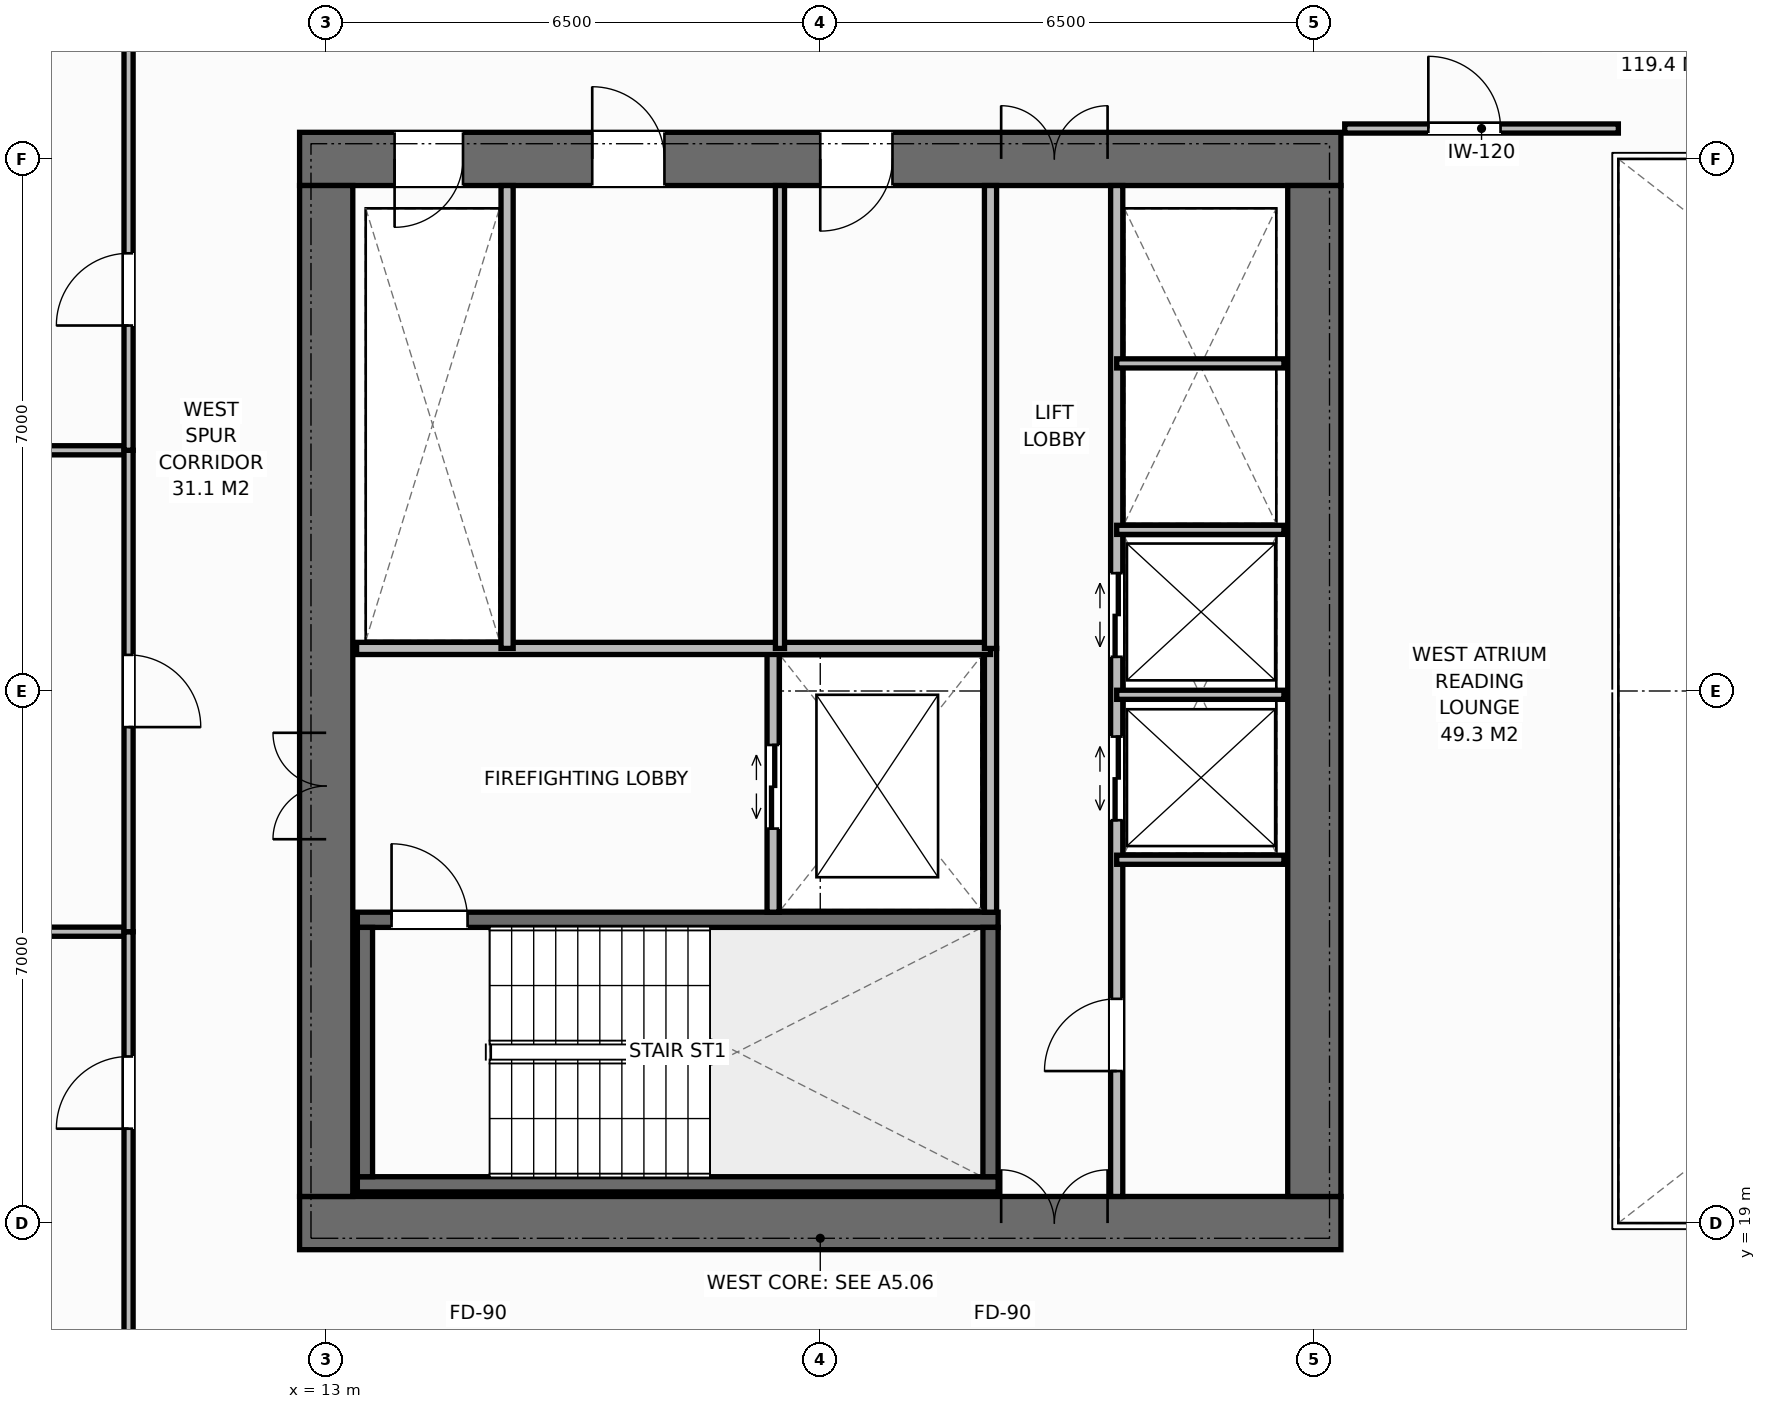
"""IFC4 building model, lengths in metres.
Left out: names, types, materials, properties, quantities, classifications, styles, units other than length and angle.
Written with IfcOpenShell. Run it as: python <this file> out.ifc"""

import sys

from ifc_helpers import new_model, si_unit, direction, frame, frame_2d, origin, place, context, subcontext, project, spatial, rectangle, extrude, element, fill, save


model = new_model("IFC4")
c1 = context("Model", 3, precision=1e-05, world=origin(), true_north=direction((0.0, 1.0)))
c2 = subcontext(c1, "Body", "Model", "MODEL_VIEW")
j1 = project(units=[si_unit("LENGTHUNIT", "METRE"), si_unit("PLANEANGLEUNIT", "RADIAN")], contexts=[c1])
p1 = place(None, origin())
s1 = spatial("IfcSite", under=j1, at=p1, CompositionType="ELEMENT")
p2 = place(p1, origin())
s2 = spatial("IfcBuilding", under=s1, at=p2, CompositionType="ELEMENT")
p3 = place(p2, frame((0.0, 0.0, 116.4)))
s3 = spatial("IfcBuildingStorey", under=s2, at=p3, CompositionType="ELEMENT", Elevation=116.4)
p4 = place(p3, frame((12.65, 19.0, 0.0), z_axis=(0.0, 0.0, 1.0), x_axis=(1.0, 0.0, 0.0)))
e1 = element("IfcWall", 1, at=p4, inside=s3, PredefinedType="SHEAR", context=c2, shape_type="SweptSolid", body=[
    extrude(rectangle(XDim=13.7, YDim=0.7, at=frame_2d((6.85, 0.0))), origin(), (0.0, 0.0, 1.0), 3.8),
])
p5 = place(p4, frame((9.23, 0.0, 0.0)))
e2 = element("IfcOpeningElement", 2, at=p5, cuts=e1, PredefinedType="OPENING", context=c2, shape_type="SweptSolid", body=[
    extrude(rectangle(XDim=1.4, YDim=2.2, at=frame_2d((0.7, 1.1))), frame((0.0, 0.36, 0.0), z_axis=(0.0, -1.0, 0.0), x_axis=(1.0, 0.0, 0.0)), (0.0, 0.0, 1.0), 0.72),
])
p6 = place(p3, frame((12.65, 33.0, 0.0), z_axis=(0.0, 0.0, 1.0), x_axis=(1.0, 0.0, 0.0)))
e3 = element("IfcWall", 3, at=p6, inside=s3, PredefinedType="SHEAR", context=c2, shape_type="SweptSolid", body=[
    extrude(rectangle(XDim=13.7, YDim=0.7, at=frame_2d((6.85, 0.0))), origin(), (0.0, 0.0, 1.0), 3.8),
])
p7 = place(p6, frame((1.25, 0.0, 0.0)))
e4 = element("IfcOpeningElement", 4, at=p7, cuts=e3, PredefinedType="OPENING", context=c2, shape_type="SweptSolid", body=[
    extrude(rectangle(XDim=0.9, YDim=2.15, at=frame_2d((0.45, 1.075))), frame((0.0, 0.36, 0.0), z_axis=(0.0, -1.0, 0.0), x_axis=(1.0, 0.0, 0.0)), (0.0, 0.0, 1.0), 0.72),
])
p8 = place(p6, frame((3.85, 0.0, 0.0)))
e5 = element("IfcOpeningElement", 5, at=p8, cuts=e3, PredefinedType="OPENING", context=c2, shape_type="SweptSolid", body=[
    extrude(rectangle(XDim=0.95, YDim=2.15, at=frame_2d((0.475, 1.075))), frame((0.0, 0.36, 0.0), z_axis=(0.0, -1.0, 0.0), x_axis=(1.0, 0.0, 0.0)), (0.0, 0.0, 1.0), 0.72),
])
p9 = place(p6, frame((6.85, 0.0, 0.0)))
e6 = element("IfcOpeningElement", 6, at=p9, cuts=e3, PredefinedType="OPENING", context=c2, shape_type="SweptSolid", body=[
    extrude(rectangle(XDim=0.95, YDim=2.15, at=frame_2d((0.475, 1.075))), frame((0.0, 0.36, 0.0), z_axis=(0.0, -1.0, 0.0), x_axis=(1.0, 0.0, 0.0)), (0.0, 0.0, 1.0), 0.72),
])
p10 = place(p6, frame((9.23, 0.0, 0.0)))
e7 = element("IfcOpeningElement", 7, at=p10, cuts=e3, PredefinedType="OPENING", context=c2, shape_type="SweptSolid", body=[
    extrude(rectangle(XDim=1.4, YDim=2.2, at=frame_2d((0.7, 1.1))), frame((0.0, 0.36, 0.0), z_axis=(0.0, -1.0, 0.0), x_axis=(1.0, 0.0, 0.0)), (0.0, 0.0, 1.0), 0.72),
])
p11 = place(p3, frame((13.0, 19.35, 0.0), z_axis=(0.0, 0.0, 1.0), x_axis=(0.0, 1.0, 0.0)))
e8 = element("IfcWall", 8, at=p11, inside=s3, PredefinedType="SHEAR", context=c2, shape_type="SweptSolid", body=[
    extrude(rectangle(XDim=13.3, YDim=0.7, at=frame_2d((6.65, 0.0))), origin(), (0.0, 0.0, 1.0), 3.8),
])
p12 = place(p11, frame((4.7, 0.0, 0.0)))
e9 = element("IfcOpeningElement", 9, at=p12, cuts=e8, PredefinedType="OPENING", context=c2, shape_type="SweptSolid", body=[
    extrude(rectangle(XDim=1.4, YDim=2.2, at=frame_2d((0.7, 1.1))), frame((0.0, 0.36, 0.0), z_axis=(0.0, -1.0, 0.0), x_axis=(1.0, 0.0, 0.0)), (0.0, 0.0, 1.0), 0.72),
])
p13 = place(p3, frame((26.0, 19.35, 0.0), z_axis=(0.0, 0.0, 1.0), x_axis=(0.0, 1.0, 0.0)))
e10 = element("IfcWall", 10, at=p13, inside=s3, PredefinedType="SHEAR", context=c2, shape_type="SweptSolid", body=[
    extrude(rectangle(XDim=13.3, YDim=0.7, at=frame_2d((6.65, 0.0))), origin(), (0.0, 0.0, 1.0), 3.8),
])
p14 = place(p3, frame((13.41, 19.51, 0.0), z_axis=(0.0, 0.0, 1.0), x_axis=(1.0, 0.0, 0.0)))
e11 = element("IfcWall", 11, at=p14, inside=s3, PredefinedType="SHEAR", context=c2, shape_type="SweptSolid", body=[
    extrude(rectangle(XDim=8.43, YDim=0.2, at=frame_2d((4.215, 0.0))), origin(), (0.0, 0.0, 1.0), 3.8),
])
p15 = place(p3, frame((13.41, 22.99, 0.0), z_axis=(0.0, 0.0, 1.0), x_axis=(1.0, 0.0, 0.0)))
e12 = element("IfcWall", 12, at=p15, inside=s3, PredefinedType="SHEAR", context=c2, shape_type="SweptSolid", body=[
    extrude(rectangle(XDim=8.43, YDim=0.2, at=frame_2d((4.215, 0.0))), origin(), (0.0, 0.0, 1.0), 3.8),
])
p16 = place(p15, frame((0.45, 0.0, 0.0)))
e13 = element("IfcOpeningElement", 13, at=p16, cuts=e12, PredefinedType="OPENING", context=c2, shape_type="SweptSolid", body=[
    extrude(rectangle(XDim=1.0, YDim=2.15, at=frame_2d((0.5, 1.075))), frame((0.0, 0.11, 0.0), z_axis=(0.0, -1.0, 0.0), x_axis=(1.0, 0.0, 0.0)), (0.0, 0.0, 1.0), 0.22),
])
for number, where, z_axis, x_axis in (
    (14, (13.51, 19.61, 0.0), (0.0, 0.0, 1.0), (0.0, 1.0, 0.0)),
    (15, (21.74, 19.61, 0.0), (0.0, 0.0, 1.0), (0.0, 1.0, 0.0)),
):
    element("IfcWall", number, at=place(p3, frame(where, z_axis=z_axis, x_axis=x_axis)), inside=s3, PredefinedType="SHEAR", context=c2, shape_type="SweptSolid", body=[
        extrude(rectangle(XDim=3.28, YDim=0.2, at=frame_2d((1.64, 0.0))), origin(), (0.0, 0.0, 1.0), 3.8),
    ])
p17 = place(p3, frame((21.74, 23.09, 0.0), z_axis=(0.0, 0.0, 1.0), x_axis=(0.0, 1.0, 0.0)))
e16 = element("IfcWall", 16, at=p17, inside=s3, PredefinedType="STANDARD", context=c2, shape_type="SweptSolid", body=[
    extrude(rectangle(XDim=3.47, YDim=0.16, at=frame_2d((1.735, 0.0))), origin(), (0.0, 0.0, 1.0), 3.565),
])
p18 = place(p3, frame((18.88, 23.09, 0.0), z_axis=(0.0, 0.0, 1.0), x_axis=(0.0, 1.0, 0.0)))
e17 = element("IfcWall", 17, at=p18, inside=s3, PredefinedType="STANDARD", context=c2, shape_type="SweptSolid", body=[
    extrude(rectangle(XDim=3.47, YDim=0.16, at=frame_2d((1.735, 0.0))), origin(), (0.0, 0.0, 1.0), 3.565),
])
p19 = place(p18, frame((1.1, 0.0, 0.0)))
e18 = element("IfcOpeningElement", 18, at=p19, cuts=e17, PredefinedType="OPENING", context=c2, shape_type="SweptSolid", body=[
    extrude(rectangle(XDim=1.1, YDim=2.2, at=frame_2d((0.55, 1.1))), frame((0.0, 0.09, 0.0), z_axis=(0.0, -1.0, 0.0), x_axis=(1.0, 0.0, 0.0)), (0.0, 0.0, 1.0), 0.18),
])
p20 = place(p3, frame((13.4, 26.56, 0.0), z_axis=(0.0, 0.0, 1.0), x_axis=(1.0, 0.0, 0.0)))
e19 = element("IfcWall", 19, at=p20, inside=s3, PredefinedType="STANDARD", context=c2, shape_type="SweptSolid", body=[
    extrude(rectangle(XDim=8.34, YDim=0.16, at=frame_2d((4.17, 0.0))), origin(), (0.0, 0.0, 1.0), 3.565),
])
p21 = place(p3, frame((15.38, 26.56, 0.0), z_axis=(0.0, 0.0, 1.0), x_axis=(0.0, 1.0, 0.0)))
e20 = element("IfcWall", 20, at=p21, inside=s3, PredefinedType="STANDARD", context=c2, shape_type="SweptSolid", body=[
    extrude(rectangle(XDim=6.09, YDim=0.16, at=frame_2d((3.045, 0.0))), origin(), (0.0, 0.0, 1.0), 3.565),
])
p22 = place(p3, frame((18.97, 26.56, 0.0), z_axis=(0.0, 0.0, 1.0), x_axis=(0.0, 1.0, 0.0)))
e21 = element("IfcWall", 21, at=p22, inside=s3, PredefinedType="PARTITIONING", context=c2, shape_type="SweptSolid", body=[
    extrude(rectangle(XDim=6.09, YDim=0.12, at=frame_2d((3.045, 0.0))), origin(), (0.0, 0.0, 1.0), 3.565),
])
p23 = place(p3, frame((21.74, 26.56, 0.0), z_axis=(0.0, 0.0, 1.0), x_axis=(0.0, 1.0, 0.0)))
e22 = element("IfcWall", 22, at=p23, inside=s3, PredefinedType="STANDARD", context=c2, shape_type="SweptSolid", body=[
    extrude(rectangle(XDim=6.09, YDim=0.16, at=frame_2d((3.045, 0.0))), origin(), (0.0, 0.0, 1.0), 3.565),
])
p24 = place(p3, frame((23.4, 19.35, 0.0), z_axis=(0.0, 0.0, 1.0), x_axis=(0.0, 1.0, 0.0)))
e23 = element("IfcWall", 23, at=p24, inside=s3, PredefinedType="STANDARD", context=c2, shape_type="SweptSolid", body=[
    extrude(rectangle(XDim=13.3, YDim=0.16, at=frame_2d((6.65, 0.0))), origin(), (0.0, 0.0, 1.0), 3.565),
])
p25 = place(p24, frame((1.65, 0.0, 0.0)))
e24 = element("IfcOpeningElement", 24, at=p25, cuts=e23, PredefinedType="OPENING", context=c2, shape_type="SweptSolid", body=[
    extrude(rectangle(XDim=0.95, YDim=2.15, at=frame_2d((0.475, 1.075))), frame((0.0, 0.09, 0.0), z_axis=(0.0, -1.0, 0.0), x_axis=(1.0, 0.0, 0.0)), (0.0, 0.0, 1.0), 0.18),
])
p26 = place(p24, frame((4.95, 0.0, 0.0)))
e25 = element("IfcOpeningElement", 25, at=p26, cuts=e23, PredefinedType="OPENING", context=c2, shape_type="SweptSolid", body=[
    extrude(rectangle(XDim=1.1, YDim=2.2, at=frame_2d((0.55, 1.1))), frame((0.0, 0.09, 0.0), z_axis=(0.0, -1.0, 0.0), x_axis=(1.0, 0.0, 0.0)), (0.0, 0.0, 1.0), 0.18),
])
p27 = place(p24, frame((7.1, 0.0, 0.0)))
e26 = element("IfcOpeningElement", 26, at=p27, cuts=e23, PredefinedType="OPENING", context=c2, shape_type="SweptSolid", body=[
    extrude(rectangle(XDim=1.1, YDim=2.2, at=frame_2d((0.55, 1.1))), frame((0.0, 0.09, 0.0), z_axis=(0.0, -1.0, 0.0), x_axis=(1.0, 0.0, 0.0)), (0.0, 0.0, 1.0), 0.18),
])
for number, where, z_axis, x_axis in (
    (27, (23.4, 23.78, 0.0), (0.0, 0.0, 1.0), (1.0, 0.0, 0.0)),
    (28, (23.4, 25.95, 0.0), (0.0, 0.0, 1.0), (1.0, 0.0, 0.0)),
    (29, (23.4, 28.12, 0.0), (0.0, 0.0, 1.0), (1.0, 0.0, 0.0)),
    (30, (23.4, 30.31, 0.0), (0.0, 0.0, 1.0), (1.0, 0.0, 0.0)),
):
    element("IfcWall", number, at=place(p3, frame(where, z_axis=z_axis, x_axis=x_axis)), inside=s3, PredefinedType="PARTITIONING", context=c2, shape_type="SweptSolid", body=[
        extrude(rectangle(XDim=2.2, YDim=0.12, at=frame_2d((1.1, 0.0))), origin(), (0.0, 0.0, 1.0), 3.565),
    ])
p28 = place(p3, frame((26.4, 33.4, 0.0), z_axis=(0.0, 0.0, 1.0), x_axis=(1.0, 0.0, 0.0)))
e31 = element("IfcWall", 31, at=p28, inside=s3, PredefinedType="PARTITIONING", context=c2, shape_type="SweptSolid", body=[
    extrude(rectangle(XDim=3.6, YDim=0.12, at=frame_2d((1.8, 0.0))), origin(), (0.0, 0.0, 1.0), 3.565),
])
p29 = place(p28, frame((1.1, 0.0, 0.0)))
e32 = element("IfcOpeningElement", 32, at=p29, cuts=e31, PredefinedType="OPENING", context=c2, shape_type="SweptSolid", body=[
    extrude(rectangle(XDim=0.95, YDim=2.15, at=frame_2d((0.475, 1.075))), frame((0.0, 0.07, 0.0), z_axis=(0.0, -1.0, 0.0), x_axis=(1.0, 0.0, 0.0)), (0.0, 0.0, 1.0), 0.14),
])
p30 = place(p3, frame((1.82, 22.833, 0.0), z_axis=(0.0, 0.0, 1.0), x_axis=(1.0, 0.0, 0.0)))
e33 = element("IfcWall", 33, at=p30, inside=s3, PredefinedType="PARTITIONING", context=c2, shape_type="SweptSolid", body=[
    extrude(rectangle(XDim=8.58, YDim=0.12, at=frame_2d((4.29, 0.0))), origin(), (0.0, 0.0, 1.0), 3.565),
])
p31 = place(p3, frame((10.4, 16.5, 0.0), z_axis=(0.0, 0.0, 1.0), x_axis=(0.0, 1.0, 0.0)))
e34 = element("IfcWall", 34, at=p31, inside=s3, PredefinedType="PARTITIONING", context=c2, shape_type="SweptSolid", body=[
    extrude(rectangle(XDim=6.333, YDim=0.12, at=frame_2d((3.167, 0.0))), origin(), (0.0, 0.0, 1.0), 3.565),
])
p32 = place(p31, frame((3.742, 0.0, 0.0)))
e35 = element("IfcOpeningElement", 35, at=p32, cuts=e34, PredefinedType="OPENING", context=c2, shape_type="SweptSolid", body=[
    extrude(rectangle(XDim=0.95, YDim=2.15, at=frame_2d((0.475, 1.075))), frame((0.0, 0.07, 0.0), z_axis=(0.0, -1.0, 0.0), x_axis=(1.0, 0.0, 0.0)), (0.0, 0.0, 1.0), 0.14),
])
p33 = place(p3, frame((1.82, 29.167, 0.0), z_axis=(0.0, 0.0, 1.0), x_axis=(1.0, 0.0, 0.0)))
e36 = element("IfcWall", 36, at=p33, inside=s3, PredefinedType="PARTITIONING", context=c2, shape_type="SweptSolid", body=[
    extrude(rectangle(XDim=8.58, YDim=0.12, at=frame_2d((4.29, 0.0))), origin(), (0.0, 0.0, 1.0), 3.565),
])
p34 = place(p3, frame((10.4, 22.833, 0.0), z_axis=(0.0, 0.0, 1.0), x_axis=(0.0, 1.0, 0.0)))
e37 = element("IfcWall", 37, at=p34, inside=s3, PredefinedType="PARTITIONING", context=c2, shape_type="SweptSolid", body=[
    extrude(rectangle(XDim=6.333, YDim=0.12, at=frame_2d((3.167, 0.0))), origin(), (0.0, 0.0, 1.0), 3.565),
])
p35 = place(p34, frame((2.692, 0.0, 0.0)))
e38 = element("IfcOpeningElement", 38, at=p35, cuts=e37, PredefinedType="OPENING", context=c2, shape_type="SweptSolid", body=[
    extrude(rectangle(XDim=0.95, YDim=2.15, at=frame_2d((0.475, 1.075))), frame((0.0, 0.07, 0.0), z_axis=(0.0, -1.0, 0.0), x_axis=(1.0, 0.0, 0.0)), (0.0, 0.0, 1.0), 0.14),
])
p36 = place(p3, frame((10.4, 29.167, 0.0), z_axis=(0.0, 0.0, 1.0), x_axis=(0.0, 1.0, 0.0)))
e39 = element("IfcWall", 39, at=p36, inside=s3, PredefinedType="PARTITIONING", context=c2, shape_type="SweptSolid", body=[
    extrude(rectangle(XDim=6.333, YDim=0.12, at=frame_2d((3.167, 0.0))), origin(), (0.0, 0.0, 1.0), 3.565),
])
p37 = place(p36, frame((1.642, 0.0, 0.0)))
e40 = element("IfcOpeningElement", 40, at=p37, cuts=e39, PredefinedType="OPENING", context=c2, shape_type="SweptSolid", body=[
    extrude(rectangle(XDim=0.95, YDim=2.15, at=frame_2d((0.475, 1.075))), frame((0.0, 0.07, 0.0), z_axis=(0.0, -1.0, 0.0), x_axis=(1.0, 0.0, 0.0)), (0.0, 0.0, 1.0), 0.14),
])
p38 = place(p16, origin())
e41 = element("IfcDoor", 41, at=p38, inside=s3, OperationType="SINGLE_SWING_LEFT", PredefinedType="DOOR", context=c2, shape_type="SweptSolid", body=[
    extrude(rectangle(XDim=1.0, YDim=2.15, at=frame_2d((0.5, 1.075))), frame((0.0, 0.025, 0.0), z_axis=(0.0, -1.0, 0.0), x_axis=(1.0, 0.0, 0.0)), (0.0, 0.0, 1.0), 0.05),
])
fill(e13, e41)
p39 = place(p12, origin())
e42 = element("IfcDoor", 42, at=p39, inside=s3, OperationType="DOUBLE_DOOR_SINGLE_SWING", PredefinedType="DOOR", context=c2, shape_type="SweptSolid", body=[
    extrude(rectangle(XDim=1.4, YDim=2.2, at=frame_2d((0.7, 1.1))), frame((0.0, 0.025, 0.0), z_axis=(0.0, -1.0, 0.0), x_axis=(1.0, 0.0, 0.0)), (0.0, 0.0, 1.0), 0.05),
])
fill(e9, e42)
p40 = place(p19, origin())
e43 = element("IfcDoor", 43, at=p40, inside=s3, OperationType="DOUBLE_DOOR_SLIDING", PredefinedType="DOOR", context=c2, shape_type="SweptSolid", body=[
    extrude(rectangle(XDim=1.1, YDim=2.2, at=frame_2d((0.55, 1.1))), frame((0.0, 0.025, 0.0), z_axis=(0.0, -1.0, 0.0), x_axis=(1.0, 0.0, 0.0)), (0.0, 0.0, 1.0), 0.05),
])
fill(e18, e43)
p41 = place(p7, origin())
e44 = element("IfcDoor", 44, at=p41, inside=s3, OperationType="SINGLE_SWING_RIGHT", PredefinedType="DOOR", context=c2, shape_type="SweptSolid", body=[
    extrude(rectangle(XDim=0.9, YDim=2.15, at=frame_2d((0.45, 1.075))), frame((0.0, -0.075, 0.0), z_axis=(0.0, -1.0, 0.0), x_axis=(1.0, 0.0, 0.0)), (0.0, 0.0, 1.0), 0.05),
])
fill(e4, e44)
p42 = place(p8, origin())
e45 = element("IfcDoor", 45, at=p42, inside=s3, OperationType="SINGLE_SWING_LEFT", PredefinedType="DOOR", context=c2, shape_type="SweptSolid", body=[
    extrude(rectangle(XDim=0.95, YDim=2.15, at=frame_2d((0.475, 1.075))), frame((0.0, -0.075, 0.0), z_axis=(0.0, -1.0, 0.0), x_axis=(1.0, 0.0, 0.0)), (0.0, 0.0, 1.0), 0.05),
])
fill(e5, e45)
p43 = place(p9, origin())
e46 = element("IfcDoor", 46, at=p43, inside=s3, OperationType="SINGLE_SWING_RIGHT", PredefinedType="DOOR", context=c2, shape_type="SweptSolid", body=[
    extrude(rectangle(XDim=0.95, YDim=2.15, at=frame_2d((0.475, 1.075))), frame((0.0, -0.075, 0.0), z_axis=(0.0, -1.0, 0.0), x_axis=(1.0, 0.0, 0.0)), (0.0, 0.0, 1.0), 0.05),
])
fill(e6, e46)
p44 = place(p5, origin())
e47 = element("IfcDoor", 47, at=p44, inside=s3, OperationType="DOUBLE_DOOR_SINGLE_SWING", PredefinedType="DOOR", context=c2, shape_type="SweptSolid", body=[
    extrude(rectangle(XDim=1.4, YDim=2.2, at=frame_2d((0.7, 1.1))), frame((0.0, 0.125, 0.0), z_axis=(0.0, -1.0, 0.0), x_axis=(1.0, 0.0, 0.0)), (0.0, 0.0, 1.0), 0.05),
])
fill(e2, e47)
p45 = place(p10, origin())
e48 = element("IfcDoor", 48, at=p45, inside=s3, OperationType="DOUBLE_DOOR_SINGLE_SWING", PredefinedType="DOOR", context=c2, shape_type="SweptSolid", body=[
    extrude(rectangle(XDim=1.4, YDim=2.2, at=frame_2d((0.7, 1.1))), frame((0.0, -0.075, 0.0), z_axis=(0.0, -1.0, 0.0), x_axis=(1.0, 0.0, 0.0)), (0.0, 0.0, 1.0), 0.05),
])
fill(e7, e48)
p46 = place(p25, origin())
e49 = element("IfcDoor", 49, at=p46, inside=s3, OperationType="SINGLE_SWING_LEFT", PredefinedType="DOOR", context=c2, shape_type="SweptSolid", body=[
    extrude(rectangle(XDim=0.95, YDim=2.15, at=frame_2d((0.475, 1.075))), frame((0.0, 0.025, 0.0), z_axis=(0.0, -1.0, 0.0), x_axis=(1.0, 0.0, 0.0)), (0.0, 0.0, 1.0), 0.05),
])
fill(e24, e49)
p47 = place(p26, origin())
e50 = element("IfcDoor", 50, at=p47, inside=s3, OperationType="DOUBLE_DOOR_SLIDING", PredefinedType="DOOR", context=c2, shape_type="SweptSolid", body=[
    extrude(rectangle(XDim=1.1, YDim=2.2, at=frame_2d((0.55, 1.1))), frame((0.0, 0.025, 0.0), z_axis=(0.0, -1.0, 0.0), x_axis=(1.0, 0.0, 0.0)), (0.0, 0.0, 1.0), 0.05),
])
fill(e25, e50)
p48 = place(p27, origin())
e51 = element("IfcDoor", 51, at=p48, inside=s3, OperationType="DOUBLE_DOOR_SLIDING", PredefinedType="DOOR", context=c2, shape_type="SweptSolid", body=[
    extrude(rectangle(XDim=1.1, YDim=2.2, at=frame_2d((0.55, 1.1))), frame((0.0, 0.025, 0.0), z_axis=(0.0, -1.0, 0.0), x_axis=(1.0, 0.0, 0.0)), (0.0, 0.0, 1.0), 0.05),
])
fill(e26, e51)
p49 = place(p29, origin())
e52 = element("IfcDoor", 52, at=p49, inside=s3, OperationType="SINGLE_SWING_LEFT", PredefinedType="DOOR", context=c2, shape_type="SweptSolid", body=[
    extrude(rectangle(XDim=0.95, YDim=2.15, at=frame_2d((0.475, 1.075))), frame((0.0, 0.025, 0.0), z_axis=(0.0, -1.0, 0.0), x_axis=(1.0, 0.0, 0.0)), (0.0, 0.0, 1.0), 0.05),
])
fill(e32, e52)
p50 = place(p32, origin())
e53 = element("IfcDoor", 53, at=p50, inside=s3, OperationType="SINGLE_SWING_LEFT", PredefinedType="DOOR", context=c2, shape_type="SweptSolid", body=[
    extrude(rectangle(XDim=0.95, YDim=2.15, at=frame_2d((0.475, 1.075))), frame((0.0, 0.025, 0.0), z_axis=(0.0, -1.0, 0.0), x_axis=(1.0, 0.0, 0.0)), (0.0, 0.0, 1.0), 0.05),
])
fill(e35, e53)
p51 = place(p35, origin())
e54 = element("IfcDoor", 54, at=p51, inside=s3, OperationType="SINGLE_SWING_RIGHT", PredefinedType="DOOR", context=c2, shape_type="SweptSolid", body=[
    extrude(rectangle(XDim=0.95, YDim=2.15, at=frame_2d((0.475, 1.075))), frame((0.0, 0.025, 0.0), z_axis=(0.0, -1.0, 0.0), x_axis=(1.0, 0.0, 0.0)), (0.0, 0.0, 1.0), 0.05),
])
fill(e38, e54)
p52 = place(p37, origin())
e55 = element("IfcDoor", 55, at=p52, inside=s3, OperationType="SINGLE_SWING_LEFT", PredefinedType="DOOR", context=c2, shape_type="SweptSolid", body=[
    extrude(rectangle(XDim=0.95, YDim=2.15, at=frame_2d((0.475, 1.075))), frame((0.0, 0.025, 0.0), z_axis=(0.0, -1.0, 0.0), x_axis=(1.0, 0.0, 0.0)), (0.0, 0.0, 1.0), 0.05),
])
fill(e40, e55)
save(model, sys.argv[1])
